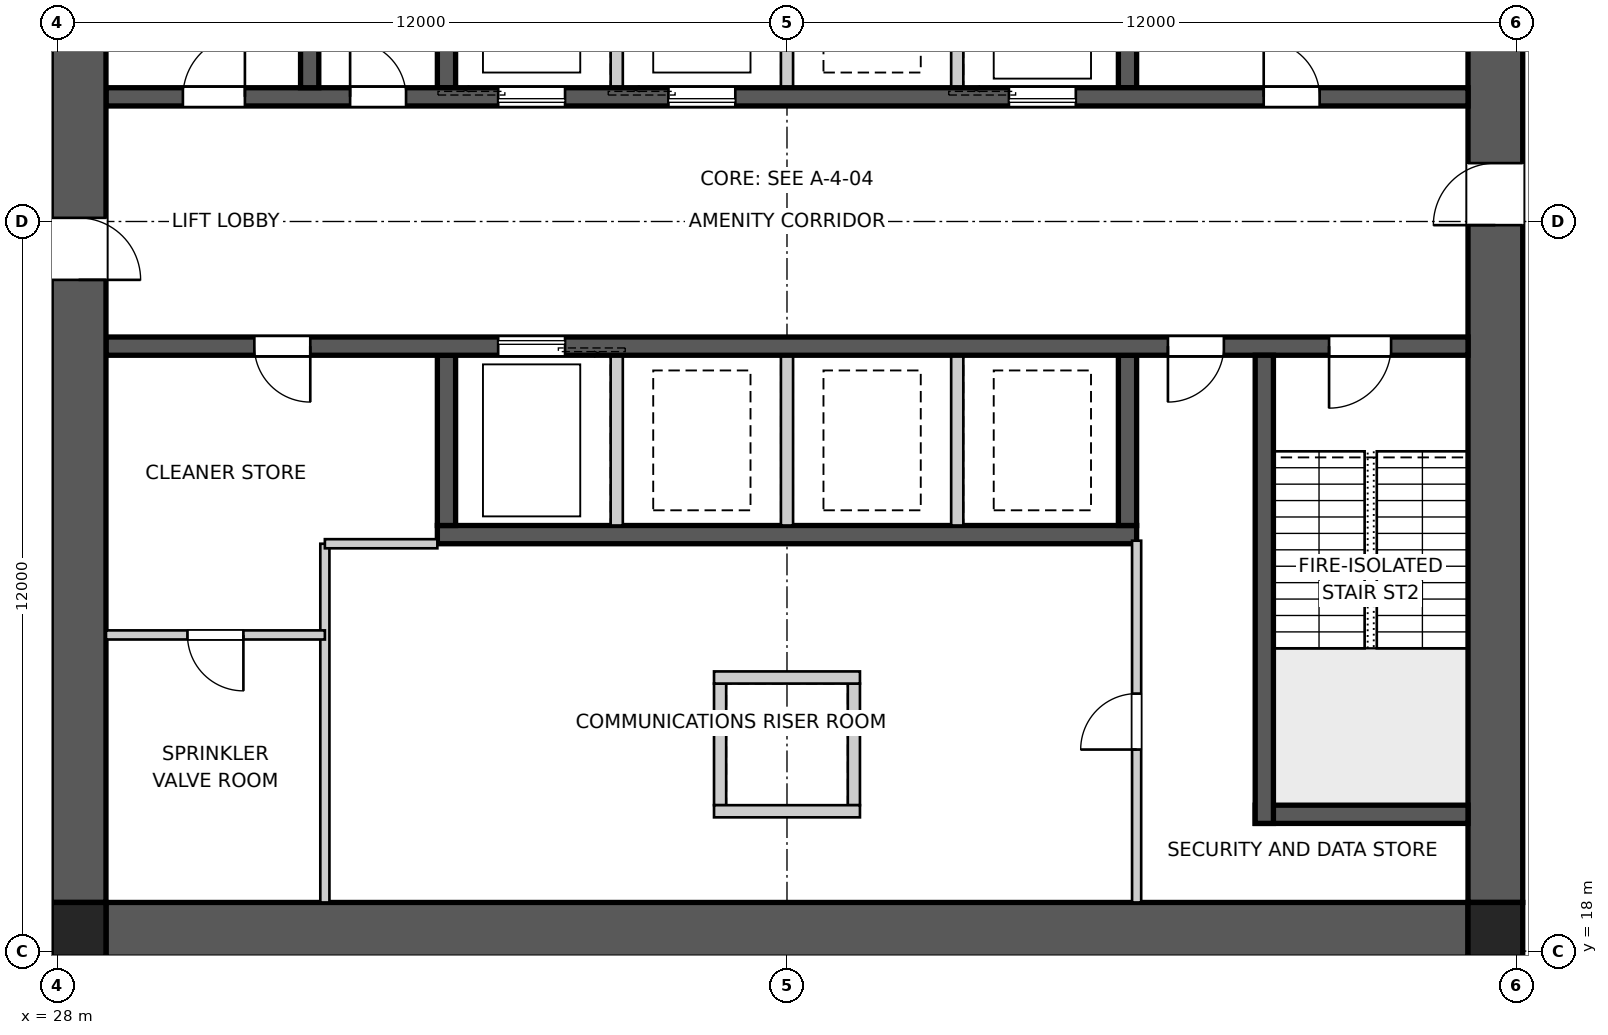
"""IFC4 building model, lengths in metres.
Left out: names, types, materials, properties, quantities, classifications, styles, units other than length and angle.
Written with IfcOpenShell. Run it as: python <this file> out.ifc"""

import sys

from ifc_helpers import new_model, si_unit, direction, frame, frame_2d, origin, origin_2d, place, context, subcontext, project, spatial, polyline, rectangle, outline, extrude, element, fill, save


model = new_model("IFC4")
c1 = context("Model", 3, precision=1e-05, world=origin(), true_north=direction((0.0, 1.0)))
c2 = subcontext(c1, "Body", "Model", "MODEL_VIEW")
j1 = project(units=[si_unit("LENGTHUNIT", "METRE"), si_unit("PLANEANGLEUNIT", "RADIAN")], contexts=[c1])
p1 = place(None, origin())
s1 = spatial("IfcSite", under=j1, at=p1, CompositionType="ELEMENT")
p2 = place(p1, origin())
s2 = spatial("IfcBuilding", under=s1, at=p2, CompositionType="ELEMENT")
p3 = place(p2, frame((0.0, 0.0, 10.5)))
s3 = spatial("IfcBuildingStorey", under=s2, at=p3, CompositionType="ELEMENT", Elevation=10.5)
p4 = place(p3, frame((51.2, 18.35, 0.0), z_axis=(0.0, 0.0, 1.0), x_axis=(-1.0, 0.0, 0.0)))
e1 = element("IfcWall", 1, at=p4, inside=s3, PredefinedType="SHEAR", context=c2, shape_type="SweptSolid", body=[
    extrude(outline(polyline([(0.0, -0.45), (22.4, -0.45), (22.4, -0.025), (22.85, -0.025), (22.85, 0.025), (22.4, 0.025), (22.4, 0.45), (0.0, 0.45), (0.0, 0.025), (-0.45, 0.025), (-0.45, -0.025), (0.0, -0.025), (0.0, -0.45)])), origin(), (0.0, 0.0, 1.0), 4.5),
])
p5 = place(p3, frame((51.65, 18.8, 0.0), z_axis=(0.0, 0.0, 1.0), x_axis=(0.0, 1.0, 0.0)))
e2 = element("IfcWall", 2, at=p5, inside=s3, PredefinedType="SHEAR", context=c2, shape_type="SweptSolid", body=[
    extrude(outline(polyline([(0.0, -0.45), (22.4, -0.45), (22.4, -0.025), (22.85, -0.025), (22.85, 0.025), (22.4, 0.025), (22.4, 0.45), (0.0, 0.45), (0.0, 0.025), (-0.45, 0.025), (-0.45, -0.025), (0.0, -0.025), (0.0, -0.45)])), origin(), (0.0, 0.0, 1.0), 4.5),
])
p6 = place(p5, frame((11.14, 0.0, 0.0)))
e3 = element("IfcOpeningElement", 3, at=p6, cuts=e2, PredefinedType="OPENING", context=c2, shape_type="SweptSolid", body=[
    extrude(rectangle(XDim=1.02, YDim=2.4, at=frame_2d((0.51, 1.2))), frame((0.0, 0.46, 0.0), z_axis=(0.0, -1.0, 0.0), x_axis=(1.0, 0.0, 0.0)), (0.0, 0.0, 1.0), 0.92),
])
p7 = place(p3, frame((28.35, 41.2, 0.0), z_axis=(0.0, 0.0, 1.0), x_axis=(0.0, -1.0, 0.0)))
e4 = element("IfcWall", 4, at=p7, inside=s3, PredefinedType="SHEAR", context=c2, shape_type="SweptSolid", body=[
    extrude(outline(polyline([(0.0, -0.45), (22.4, -0.45), (22.4, -0.025), (22.85, -0.025), (22.85, 0.025), (22.4, 0.025), (22.4, 0.45), (0.0, 0.45), (0.0, 0.025), (-0.45, 0.025), (-0.45, -0.025), (0.0, -0.025), (0.0, -0.45)])), origin(), (0.0, 0.0, 1.0), 4.5),
])
p8 = place(p7, frame((11.14, 0.0, 0.0)))
e5 = element("IfcOpeningElement", 5, at=p8, cuts=e4, PredefinedType="OPENING", context=c2, shape_type="SweptSolid", body=[
    extrude(rectangle(XDim=1.02, YDim=2.4, at=frame_2d((0.51, 1.2))), frame((0.0, 0.46, 0.0), z_axis=(0.0, -1.0, 0.0), x_axis=(1.0, 0.0, 0.0)), (0.0, 0.0, 1.0), 0.92),
])
p9 = place(p3, frame((28.8, 32.05, 0.0), z_axis=(0.0, 0.0, 1.0), x_axis=(1.0, 0.0, 0.0)))
e6 = element("IfcWall", 6, at=p9, inside=s3, PredefinedType="SHEAR", context=c2, shape_type="SweptSolid", body=[
    extrude(rectangle(XDim=22.4, YDim=0.3, at=frame_2d((11.2, 0.0))), origin(), (0.0, 0.0, 1.0), 4.5),
])
p10 = place(p9, frame((19.04, 0.0, 0.0)))
e7 = element("IfcOpeningElement", 7, at=p10, cuts=e6, PredefinedType="OPENING", context=c2, shape_type="SweptSolid", body=[
    extrude(rectangle(XDim=0.92, YDim=2.1, at=frame_2d((0.46, 1.05))), frame((0.0, 0.16, 0.0), z_axis=(0.0, -1.0, 0.0), x_axis=(1.0, 0.0, 0.0)), (0.0, 0.0, 1.0), 0.32),
])
p11 = place(p9, frame((1.265, 0.0, 0.0)))
e8 = element("IfcOpeningElement", 8, at=p11, cuts=e6, PredefinedType="OPENING", context=c2, shape_type="SweptSolid", body=[
    extrude(rectangle(XDim=1.02, YDim=2.1, at=frame_2d((0.51, 1.05))), frame((0.0, 0.16, 0.0), z_axis=(0.0, -1.0, 0.0), x_axis=(1.0, 0.0, 0.0)), (0.0, 0.0, 1.0), 0.32),
])
p12 = place(p9, frame((4.015, 0.0, 0.0)))
e9 = element("IfcOpeningElement", 9, at=p12, cuts=e6, PredefinedType="OPENING", context=c2, shape_type="SweptSolid", body=[
    extrude(rectangle(XDim=0.92, YDim=2.1, at=frame_2d((0.46, 1.05))), frame((0.0, 0.16, 0.0), z_axis=(0.0, -1.0, 0.0), x_axis=(1.0, 0.0, 0.0)), (0.0, 0.0, 1.0), 0.32),
])
p13 = place(p9, frame((6.45, 0.0, 0.0)))
e10 = element("IfcOpeningElement", 10, at=p13, cuts=e6, PredefinedType="OPENING", context=c2, shape_type="SweptSolid", body=[
    extrude(rectangle(XDim=1.1, YDim=2.1, at=frame_2d((0.55, 1.05))), frame((0.0, 0.16, 0.0), z_axis=(0.0, -1.0, 0.0), x_axis=(1.0, 0.0, 0.0)), (0.0, 0.0, 1.0), 0.32),
])
p14 = place(p9, frame((9.25, 0.0, 0.0)))
e11 = element("IfcOpeningElement", 11, at=p14, cuts=e6, PredefinedType="OPENING", context=c2, shape_type="SweptSolid", body=[
    extrude(rectangle(XDim=1.1, YDim=2.1, at=frame_2d((0.55, 1.05))), frame((0.0, 0.16, 0.0), z_axis=(0.0, -1.0, 0.0), x_axis=(1.0, 0.0, 0.0)), (0.0, 0.0, 1.0), 0.32),
])
p15 = place(p9, frame((14.85, 0.0, 0.0)))
e12 = element("IfcOpeningElement", 12, at=p15, cuts=e6, PredefinedType="OPENING", context=c2, shape_type="SweptSolid", body=[
    extrude(rectangle(XDim=1.1, YDim=2.1, at=frame_2d((0.55, 1.05))), frame((0.0, 0.16, 0.0), z_axis=(0.0, -1.0, 0.0), x_axis=(1.0, 0.0, 0.0)), (0.0, 0.0, 1.0), 0.32),
])
p16 = place(p3, frame((51.2, 27.95, 0.0), z_axis=(0.0, 0.0, 1.0), x_axis=(-1.0, 0.0, 0.0)))
e13 = element("IfcWall", 13, at=p16, inside=s3, PredefinedType="SHEAR", context=c2, shape_type="SweptSolid", body=[
    extrude(rectangle(XDim=22.4, YDim=0.3, at=frame_2d((11.2, 0.0))), origin(), (0.0, 0.0, 1.0), 4.5),
])
p17 = place(p16, frame((19.04, 0.0, 0.0)))
e14 = element("IfcOpeningElement", 14, at=p17, cuts=e13, PredefinedType="OPENING", context=c2, shape_type="SweptSolid", body=[
    extrude(rectangle(XDim=0.92, YDim=2.1, at=frame_2d((0.46, 1.05))), frame((0.0, 0.16, 0.0), z_axis=(0.0, -1.0, 0.0), x_axis=(1.0, 0.0, 0.0)), (0.0, 0.0, 1.0), 0.32),
])
p18 = place(p16, frame((1.265, 0.0, 0.0)))
e15 = element("IfcOpeningElement", 15, at=p18, cuts=e13, PredefinedType="OPENING", context=c2, shape_type="SweptSolid", body=[
    extrude(rectangle(XDim=1.02, YDim=2.1, at=frame_2d((0.51, 1.05))), frame((0.0, 0.16, 0.0), z_axis=(0.0, -1.0, 0.0), x_axis=(1.0, 0.0, 0.0)), (0.0, 0.0, 1.0), 0.32),
])
p19 = place(p16, frame((4.015, 0.0, 0.0)))
e16 = element("IfcOpeningElement", 16, at=p19, cuts=e13, PredefinedType="OPENING", context=c2, shape_type="SweptSolid", body=[
    extrude(rectangle(XDim=0.92, YDim=2.1, at=frame_2d((0.46, 1.05))), frame((0.0, 0.16, 0.0), z_axis=(0.0, -1.0, 0.0), x_axis=(1.0, 0.0, 0.0)), (0.0, 0.0, 1.0), 0.32),
])
p20 = place(p16, frame((14.85, 0.0, 0.0)))
e17 = element("IfcOpeningElement", 17, at=p20, cuts=e13, PredefinedType="OPENING", context=c2, shape_type="SweptSolid", body=[
    extrude(rectangle(XDim=1.1, YDim=2.1, at=frame_2d((0.55, 1.05))), frame((0.0, 0.16, 0.0), z_axis=(0.0, -1.0, 0.0), x_axis=(1.0, 0.0, 0.0)), (0.0, 0.0, 1.0), 0.32),
])
p21 = place(p3, frame((45.75, 24.85, 0.0), z_axis=(0.0, 0.0, 1.0), x_axis=(-1.0, 0.0, 0.0)))
e18 = element("IfcWall", 18, at=p21, inside=s3, PredefinedType="SHEAR", context=c2, shape_type="SweptSolid", body=[
    extrude(rectangle(XDim=11.5, YDim=0.3, at=frame_2d((5.75, 0.0))), origin(), (0.0, 0.0, 1.0), 4.5),
])
for number, where, z_axis, x_axis in (
    (19, (34.4, 32.2, 0.0), (0.0, 0.0, 1.0), (0.0, 1.0, 0.0)),
    (20, (45.6, 27.8, 0.0), (0.0, 0.0, 1.0), (0.0, -1.0, 0.0)),
):
    element("IfcWall", number, at=place(p3, frame(where, z_axis=z_axis, x_axis=x_axis)), inside=s3, PredefinedType="SHEAR", context=c2, shape_type="SweptSolid", body=[
        extrude(rectangle(XDim=2.8, YDim=0.3, at=frame_2d((1.4, 0.0))), origin(), (0.0, 0.0, 1.0), 4.5),
    ])
for number, where, z_axis, x_axis in (
    (21, (37.2, 32.2, 0.0), (0.0, 0.0, 1.0), (0.0, 1.0, 0.0)),
    (22, (42.8, 27.8, 0.0), (0.0, 0.0, 1.0), (0.0, -1.0, 0.0)),
    (23, (40.0, 32.2, 0.0), (0.0, 0.0, 1.0), (0.0, 1.0, 0.0)),
    (24, (40.0, 27.8, 0.0), (0.0, 0.0, 1.0), (0.0, -1.0, 0.0)),
    (25, (42.8, 32.2, 0.0), (0.0, 0.0, 1.0), (0.0, 1.0, 0.0)),
    (26, (37.2, 27.8, 0.0), (0.0, 0.0, 1.0), (0.0, -1.0, 0.0)),
):
    element("IfcWall", number, at=place(p3, frame(where, z_axis=z_axis, x_axis=x_axis)), inside=s3, PredefinedType="SOLIDWALL", context=c2, shape_type="SweptSolid", body=[
        extrude(rectangle(XDim=2.8, YDim=0.2, at=frame_2d((1.4, 0.0))), origin(), (0.0, 0.0, 1.0), 4.5),
    ])
for number, where, z_axis, x_axis in (
    (27, (45.6, 32.2, 0.0), (0.0, 0.0, 1.0), (0.0, 1.0, 0.0)),
    (28, (34.4, 27.8, 0.0), (0.0, 0.0, 1.0), (0.0, -1.0, 0.0)),
):
    element("IfcWall", number, at=place(p3, frame(where, z_axis=z_axis, x_axis=x_axis)), inside=s3, PredefinedType="SHEAR", context=c2, shape_type="SweptSolid", body=[
        extrude(rectangle(XDim=2.8, YDim=0.3, at=frame_2d((1.4, 0.0))), origin(), (0.0, 0.0, 1.0), 4.5),
    ])
for number, where, z_axis, x_axis in (
    (29, (32.15, 32.2, 0.0), (0.0, 0.0, 1.0), (0.0, 1.0, 0.0)),
    (30, (47.85, 27.8, 0.0), (0.0, 0.0, 1.0), (0.0, -1.0, 0.0)),
):
    element("IfcWall", number, at=place(p3, frame(where, z_axis=z_axis, x_axis=x_axis)), inside=s3, PredefinedType="SHEAR", context=c2, shape_type="SweptSolid", body=[
        extrude(rectangle(XDim=7.7, YDim=0.3, at=frame_2d((3.85, 0.0))), origin(), (0.0, 0.0, 1.0), 4.5),
    ])
p22 = place(p3, frame((51.2, 20.25, 0.0), z_axis=(0.0, 0.0, 1.0), x_axis=(-1.0, 0.0, 0.0)))
e31 = element("IfcWall", 31, at=p22, inside=s3, PredefinedType="SHEAR", context=c2, shape_type="SweptSolid", body=[
    extrude(rectangle(XDim=3.5, YDim=0.3, at=frame_2d((1.75, 0.0))), origin(), (0.0, 0.0, 1.0), 4.5),
])
for number, where, z_axis, x_axis in (
    (32, (38.9, 22.4, 0.0), (0.0, 0.0, 1.0), (0.0, -1.0, 0.0)),
    (33, (41.1, 22.4, 0.0), (0.0, 0.0, 1.0), (0.0, -1.0, 0.0)),
):
    element("IfcWall", number, at=place(p3, frame(where, z_axis=z_axis, x_axis=x_axis)), inside=s3, PredefinedType="SOLIDWALL", context=c2, shape_type="SweptSolid", body=[
        extrude(rectangle(XDim=2.0, YDim=0.2, at=frame_2d((1.0, 0.0))), origin(), (0.0, 0.0, 1.0), 4.5),
    ])
for number, where, z_axis, x_axis in (
    (34, (38.8, 22.5, 0.0), (0.0, 0.0, 1.0), (1.0, 0.0, 0.0)),
    (35, (38.8, 20.3, 0.0), (0.0, 0.0, 1.0), (1.0, 0.0, 0.0)),
):
    element("IfcWall", number, at=place(p3, frame(where, z_axis=z_axis, x_axis=x_axis)), inside=s3, PredefinedType="SOLIDWALL", context=c2, shape_type="SweptSolid", body=[
        extrude(rectangle(XDim=2.4, YDim=0.2, at=frame_2d((1.2, 0.0))), origin(), (0.0, 0.0, 1.0), 4.5),
    ])
for number, where, z_axis, x_axis in (
    (36, (28.35, 18.35, 0.0), (0.0, 0.0, 1.0), (1.0, 0.0, 0.0)),
    (37, (51.65, 18.35, 0.0), (0.0, 0.0, 1.0), (1.0, 0.0, 0.0)),
):
    element("IfcColumn", number, at=place(p3, frame(where, z_axis=z_axis, x_axis=x_axis)), inside=s3, PredefinedType="COLUMN", context=c2, shape_type="SweptSolid", body=[
        extrude(rectangle(XDim=0.9, YDim=0.9, at=origin_2d()), origin(), (0.0, 0.0, 1.0), 4.5),
    ])
p23 = place(p3, frame((45.75, 18.8, 0.0), z_axis=(0.0, 0.0, 1.0), x_axis=(0.0, 1.0, 0.0)))
e38 = element("IfcWall", 38, at=p23, inside=s3, PredefinedType="SOLIDWALL", context=c2, shape_type="SweptSolid", body=[
    extrude(rectangle(XDim=5.95, YDim=0.15, at=frame_2d((2.975, 0.0))), origin(), (0.0, 0.0, 1.0), 4.35),
])
p24 = place(p23, frame((2.515, 0.0, 0.0)))
e39 = element("IfcOpeningElement", 39, at=p24, cuts=e38, PredefinedType="OPENING", context=c2, shape_type="SweptSolid", body=[
    extrude(rectangle(XDim=0.92, YDim=2.1, at=frame_2d((0.46, 1.05))), frame((0.0, 0.085, 0.0), z_axis=(0.0, -1.0, 0.0), x_axis=(1.0, 0.0, 0.0)), (0.0, 0.0, 1.0), 0.17),
])
p25 = place(p3, frame((32.4, 18.8, 0.0), z_axis=(0.0, 0.0, 1.0), x_axis=(0.0, 1.0, 0.0)))
e40 = element("IfcWall", 40, at=p25, inside=s3, PredefinedType="SOLIDWALL", context=c2, shape_type="SweptSolid", body=[
    extrude(rectangle(XDim=5.9, YDim=0.15, at=frame_2d((2.95, 0.0))), origin(), (0.0, 0.0, 1.0), 4.35),
])
p26 = place(p3, frame((32.4, 24.7, 0.0), z_axis=(0.0, 0.0, 1.0), x_axis=(1.0, 0.0, 0.0)))
e41 = element("IfcWall", 41, at=p26, inside=s3, PredefinedType="SOLIDWALL", context=c2, shape_type="SweptSolid", body=[
    extrude(rectangle(XDim=1.85, YDim=0.15, at=frame_2d((0.925, 0.0))), origin(), (0.0, 0.0, 1.0), 4.35),
])
p27 = place(p3, frame((32.4, 23.2, 0.0), z_axis=(0.0, 0.0, 1.0), x_axis=(-1.0, 0.0, 0.0)))
e42 = element("IfcWall", 42, at=p27, inside=s3, PredefinedType="SOLIDWALL", context=c2, shape_type="SweptSolid", body=[
    extrude(rectangle(XDim=3.6, YDim=0.15, at=frame_2d((1.8, 0.0))), origin(), (0.0, 0.0, 1.0), 4.35),
])
p28 = place(p27, frame((1.34, 0.0, 0.0)))
e43 = element("IfcOpeningElement", 43, at=p28, cuts=e42, PredefinedType="OPENING", context=c2, shape_type="SweptSolid", body=[
    extrude(rectangle(XDim=0.92, YDim=2.1, at=frame_2d((0.46, 1.05))), frame((0.0, 0.085, 0.0), z_axis=(0.0, -1.0, 0.0), x_axis=(1.0, 0.0, 0.0)), (0.0, 0.0, 1.0), 0.17),
])
p29 = place(p10, origin())
e44 = element("IfcDoor", 44, at=p29, inside=s3, OperationType="SINGLE_SWING_LEFT", PredefinedType="DOOR", context=c2, shape_type="SweptSolid", body=[
    extrude(rectangle(XDim=0.92, YDim=2.1, at=frame_2d((0.46, 1.05))), frame((0.0, 0.025, 0.0), z_axis=(0.0, -1.0, 0.0), x_axis=(1.0, 0.0, 0.0)), (0.0, 0.0, 1.0), 0.05),
])
fill(e7, e44)
p30 = place(p17, origin())
e45 = element("IfcDoor", 45, at=p30, inside=s3, OperationType="SINGLE_SWING_LEFT", PredefinedType="DOOR", context=c2, shape_type="SweptSolid", body=[
    extrude(rectangle(XDim=0.92, YDim=2.1, at=frame_2d((0.46, 1.05))), frame((0.0, 0.025, 0.0), z_axis=(0.0, -1.0, 0.0), x_axis=(1.0, 0.0, 0.0)), (0.0, 0.0, 1.0), 0.05),
])
fill(e14, e45)
p31 = place(p18, origin())
e46 = element("IfcDoor", 46, at=p31, inside=s3, OperationType="SINGLE_SWING_RIGHT", PredefinedType="DOOR", context=c2, shape_type="SweptSolid", body=[
    extrude(rectangle(XDim=1.02, YDim=2.1, at=frame_2d((0.51, 1.05))), frame((0.0, 0.025, 0.0), z_axis=(0.0, -1.0, 0.0), x_axis=(1.0, 0.0, 0.0)), (0.0, 0.0, 1.0), 0.05),
])
fill(e15, e46)
p32 = place(p11, origin())
e47 = element("IfcDoor", 47, at=p32, inside=s3, OperationType="SINGLE_SWING_RIGHT", PredefinedType="DOOR", context=c2, shape_type="SweptSolid", body=[
    extrude(rectangle(XDim=1.02, YDim=2.1, at=frame_2d((0.51, 1.05))), frame((0.0, 0.025, 0.0), z_axis=(0.0, -1.0, 0.0), x_axis=(1.0, 0.0, 0.0)), (0.0, 0.0, 1.0), 0.05),
])
fill(e8, e47)
p33 = place(p12, origin())
e48 = element("IfcDoor", 48, at=p33, inside=s3, OperationType="SINGLE_SWING_LEFT", PredefinedType="DOOR", context=c2, shape_type="SweptSolid", body=[
    extrude(rectangle(XDim=0.92, YDim=2.1, at=frame_2d((0.46, 1.05))), frame((0.0, 0.025, 0.0), z_axis=(0.0, -1.0, 0.0), x_axis=(1.0, 0.0, 0.0)), (0.0, 0.0, 1.0), 0.05),
])
fill(e9, e48)
p34 = place(p19, origin())
e49 = element("IfcDoor", 49, at=p34, inside=s3, OperationType="SINGLE_SWING_RIGHT", PredefinedType="DOOR", context=c2, shape_type="SweptSolid", body=[
    extrude(rectangle(XDim=0.92, YDim=2.1, at=frame_2d((0.46, 1.05))), frame((0.0, 0.025, 0.0), z_axis=(0.0, -1.0, 0.0), x_axis=(1.0, 0.0, 0.0)), (0.0, 0.0, 1.0), 0.05),
])
fill(e16, e49)
p35 = place(p28, origin())
e50 = element("IfcDoor", 50, at=p35, inside=s3, OperationType="SINGLE_SWING_LEFT", PredefinedType="DOOR", context=c2, shape_type="SweptSolid", body=[
    extrude(rectangle(XDim=0.92, YDim=2.1, at=frame_2d((0.46, 1.05))), frame((0.0, 0.025, 0.0), z_axis=(0.0, -1.0, 0.0), x_axis=(1.0, 0.0, 0.0)), (0.0, 0.0, 1.0), 0.05),
])
fill(e43, e50)
p36 = place(p24, origin())
e51 = element("IfcDoor", 51, at=p36, inside=s3, OperationType="SINGLE_SWING_LEFT", PredefinedType="DOOR", context=c2, shape_type="SweptSolid", body=[
    extrude(rectangle(XDim=0.92, YDim=2.1, at=frame_2d((0.46, 1.05))), frame((0.0, 0.025, 0.0), z_axis=(0.0, -1.0, 0.0), x_axis=(1.0, 0.0, 0.0)), (0.0, 0.0, 1.0), 0.05),
])
fill(e39, e51)
p37 = place(p6, origin())
e52 = element("IfcDoor", 52, at=p37, inside=s3, OperationType="SINGLE_SWING_LEFT", PredefinedType="DOOR", context=c2, shape_type="SweptSolid", body=[
    extrude(rectangle(XDim=1.02, YDim=2.4, at=frame_2d((0.51, 1.2))), frame((0.0, 0.025, 0.0), z_axis=(0.0, -1.0, 0.0), x_axis=(1.0, 0.0, 0.0)), (0.0, 0.0, 1.0), 0.05),
])
fill(e3, e52)
p38 = place(p8, origin())
e53 = element("IfcDoor", 53, at=p38, inside=s3, OperationType="SINGLE_SWING_RIGHT", PredefinedType="DOOR", context=c2, shape_type="SweptSolid", body=[
    extrude(rectangle(XDim=1.02, YDim=2.4, at=frame_2d((0.51, 1.2))), frame((0.0, 0.025, 0.0), z_axis=(0.0, -1.0, 0.0), x_axis=(1.0, 0.0, 0.0)), (0.0, 0.0, 1.0), 0.05),
])
fill(e5, e53)
p39 = place(p13, origin())
e54 = element("IfcDoor", 54, at=p39, inside=s3, OperationType="SLIDING_TO_LEFT", PredefinedType="DOOR", context=c2, shape_type="SweptSolid", body=[
    extrude(rectangle(XDim=1.1, YDim=2.1, at=frame_2d((0.55, 1.05))), frame((0.0, 0.025, 0.0), z_axis=(0.0, -1.0, 0.0), x_axis=(1.0, 0.0, 0.0)), (0.0, 0.0, 1.0), 0.05),
])
fill(e10, e54)
p40 = place(p14, origin())
e55 = element("IfcDoor", 55, at=p40, inside=s3, OperationType="SLIDING_TO_LEFT", PredefinedType="DOOR", context=c2, shape_type="SweptSolid", body=[
    extrude(rectangle(XDim=1.1, YDim=2.1, at=frame_2d((0.55, 1.05))), frame((0.0, 0.025, 0.0), z_axis=(0.0, -1.0, 0.0), x_axis=(1.0, 0.0, 0.0)), (0.0, 0.0, 1.0), 0.05),
])
fill(e11, e55)
p41 = place(p15, origin())
e56 = element("IfcDoor", 56, at=p41, inside=s3, OperationType="SLIDING_TO_LEFT", PredefinedType="DOOR", context=c2, shape_type="SweptSolid", body=[
    extrude(rectangle(XDim=1.1, YDim=2.1, at=frame_2d((0.55, 1.05))), frame((0.0, 0.025, 0.0), z_axis=(0.0, -1.0, 0.0), x_axis=(1.0, 0.0, 0.0)), (0.0, 0.0, 1.0), 0.05),
])
fill(e12, e56)
p42 = place(p20, origin())
e57 = element("IfcDoor", 57, at=p42, inside=s3, OperationType="SLIDING_TO_LEFT", PredefinedType="DOOR", context=c2, shape_type="SweptSolid", body=[
    extrude(rectangle(XDim=1.1, YDim=2.1, at=frame_2d((0.55, 1.05))), frame((0.0, 0.025, 0.0), z_axis=(0.0, -1.0, 0.0), x_axis=(1.0, 0.0, 0.0)), (0.0, 0.0, 1.0), 0.05),
])
fill(e17, e57)
save(model, sys.argv[1])
